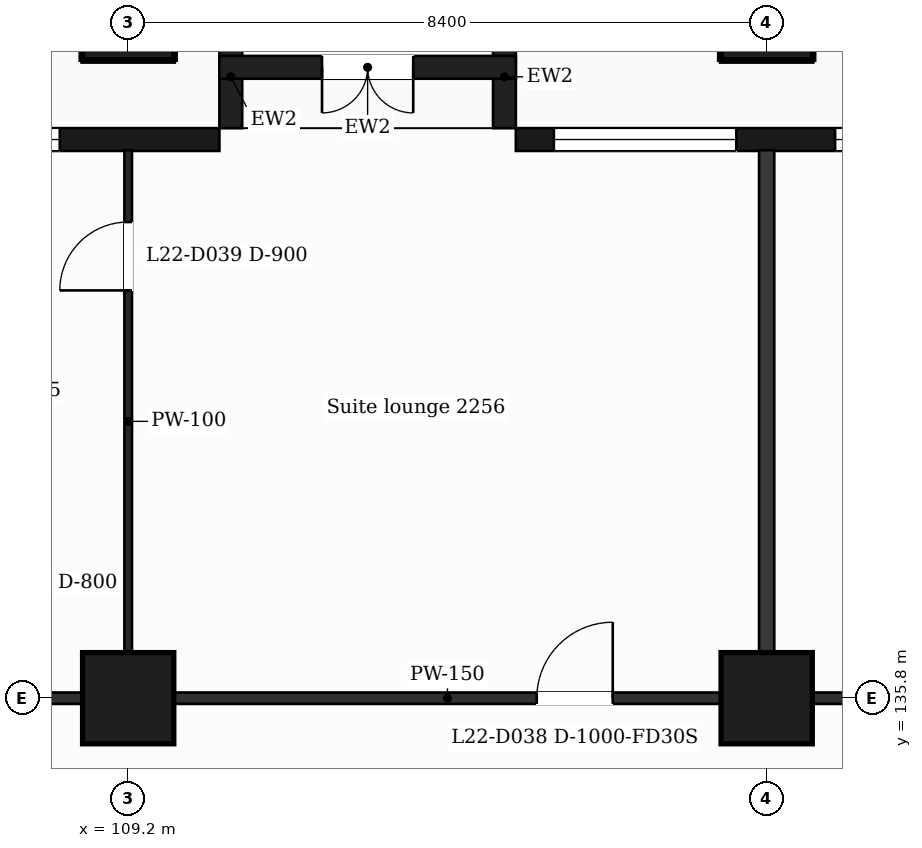
"""IFC4 building model, lengths in metres.
Left out: names, types, materials, properties, quantities, classifications, styles, units other than length and angle.
Written with IfcOpenShell. Run it as: python <this file> out.ifc"""

import sys

from ifc_helpers import new_model, si_unit, direction, frame, frame_2d, origin, origin_2d, place, context, subcontext, project, spatial, rectangle, extrude, element, fill, save


model = new_model("IFC4")
c1 = context("Model", 3, precision=1e-05, world=origin(), true_north=direction((0.0, 1.0)))
c2 = subcontext(c1, "Body", "Model", "MODEL_VIEW")
j1 = project(units=[si_unit("LENGTHUNIT", "METRE"), si_unit("PLANEANGLEUNIT", "RADIAN")], contexts=[c1])
p1 = place(None, origin())
s1 = spatial("IfcSite", under=j1, at=p1, CompositionType="ELEMENT")
p2 = place(p1, origin())
s2 = spatial("IfcBuilding", under=s1, at=p2, CompositionType="ELEMENT")
p3 = place(p2, frame((0.0, 0.0, 98.4)))
s3 = spatial("IfcBuildingStorey", under=s2, at=p3, CompositionType="ELEMENT", Elevation=98.4)
for number, where, z_axis, x_axis in (
    (1, (109.2, 135.8, 0.0), (0.0, 0.0, 1.0), (1.0, 0.0, 0.0)),
    (2, (117.6, 135.8, 0.0), (0.0, 0.0, 1.0), (1.0, 0.0, 0.0)),
    (3, (109.2, 144.8, 0.0), (0.0, 0.0, 1.0), (1.0, 0.0, 0.0)),
    (4, (117.6, 144.8, 0.0), (0.0, 0.0, 1.0), (1.0, 0.0, 0.0)),
):
    element("IfcColumn", number, at=place(p3, frame(where, z_axis=z_axis, x_axis=x_axis)), inside=s3, PredefinedType="COLUMN", context=c2, shape_type="SweptSolid", body=[
        extrude(rectangle(XDim=1.2, YDim=1.2, at=origin_2d()), origin(), (0.0, 0.0, 1.0), 3.7),
    ])
p4 = place(p3, frame((130.65, 143.15, 0.0), z_axis=(0.0, 0.0, 1.0), x_axis=(-1.0, 0.0, 0.0)))
e5 = element("IfcWall", 5, at=p4, inside=s3, PredefinedType="SOLIDWALL", context=c2, shape_type="SweptSolid", body=[
    extrude(rectangle(XDim=16.35, YDim=0.3, at=frame_2d((8.175, 0.0))), origin(), (0.0, 0.0, 1.0), 3.38),
])
p5 = place(p4, frame((1.95, 0.0, 0.9)))
e6 = element("IfcOpeningElement", 6, at=p5, cuts=e5, PredefinedType="OPENING", context=c2, shape_type="SweptSolid", body=[
    extrude(rectangle(XDim=1.2, YDim=2.1, at=frame_2d((0.6, 1.05))), frame((0.0, 0.16, 0.0), z_axis=(0.0, -1.0, 0.0), x_axis=(1.0, 0.0, 0.0)), (0.0, 0.0, 1.0), 0.32),
])
p6 = place(p4, frame((6.15, 0.0, 0.0)))
e7 = element("IfcOpeningElement", 7, at=p6, cuts=e5, PredefinedType="OPENING", context=c2, shape_type="SweptSolid", body=[
    extrude(rectangle(XDim=1.2, YDim=2.4, at=frame_2d((0.6, 1.2))), frame((0.0, 0.16, 0.0), z_axis=(0.0, -1.0, 0.0), x_axis=(1.0, 0.0, 0.0)), (0.0, 0.0, 1.0), 0.32),
])
p7 = place(p4, frame((9.75, 0.0, 0.9)))
e8 = element("IfcOpeningElement", 8, at=p7, cuts=e5, PredefinedType="OPENING", context=c2, shape_type="SweptSolid", body=[
    extrude(rectangle(XDim=2.4, YDim=2.1, at=frame_2d((1.2, 1.05))), frame((0.0, 0.16, 0.0), z_axis=(0.0, -1.0, 0.0), x_axis=(1.0, 0.0, 0.0)), (0.0, 0.0, 1.0), 0.32),
])
p8 = place(p4, frame((13.45, 0.0, 0.9)))
e9 = element("IfcOpeningElement", 9, at=p8, cuts=e5, PredefinedType="OPENING", context=c2, shape_type="SweptSolid", body=[
    extrude(rectangle(XDim=2.4, YDim=2.1, at=frame_2d((1.2, 1.05))), frame((0.0, 0.16, 0.0), z_axis=(0.0, -1.0, 0.0), x_axis=(1.0, 0.0, 0.0)), (0.0, 0.0, 1.0), 0.32),
])
p9 = place(p3, frame((110.4, 143.15, 0.0), z_axis=(0.0, 0.0, 1.0), x_axis=(-1.0, 0.0, 0.0)))
e10 = element("IfcWall", 10, at=p9, inside=s3, PredefinedType="SOLIDWALL", context=c2, shape_type="SweptSolid", body=[
    extrude(rectangle(XDim=14.4, YDim=0.3, at=frame_2d((7.2, 0.0))), origin(), (0.0, 0.0, 1.0), 3.38),
])
p10 = place(p9, frame((2.1, 0.0, 0.9)))
e11 = element("IfcOpeningElement", 11, at=p10, cuts=e10, PredefinedType="OPENING", context=c2, shape_type="SweptSolid", body=[
    extrude(rectangle(XDim=2.4, YDim=2.1, at=frame_2d((1.2, 1.05))), frame((0.0, 0.16, 0.0), z_axis=(0.0, -1.0, 0.0), x_axis=(1.0, 0.0, 0.0)), (0.0, 0.0, 1.0), 0.32),
])
p11 = place(p9, frame((6.9, 0.0, 0.0)))
e12 = element("IfcOpeningElement", 12, at=p11, cuts=e10, PredefinedType="OPENING", context=c2, shape_type="SweptSolid", body=[
    extrude(rectangle(XDim=1.2, YDim=2.4, at=frame_2d((0.6, 1.2))), frame((0.0, 0.16, 0.0), z_axis=(0.0, -1.0, 0.0), x_axis=(1.0, 0.0, 0.0)), (0.0, 0.0, 1.0), 0.32),
])
p12 = place(p9, frame((11.1, 0.0, 0.9)))
e13 = element("IfcOpeningElement", 13, at=p12, cuts=e10, PredefinedType="OPENING", context=c2, shape_type="SweptSolid", body=[
    extrude(rectangle(XDim=1.2, YDim=2.1, at=frame_2d((0.6, 1.05))), frame((0.0, 0.16, 0.0), z_axis=(0.0, -1.0, 0.0), x_axis=(1.0, 0.0, 0.0)), (0.0, 0.0, 1.0), 0.32),
])
for number, where, z_axis, x_axis in (
    (14, (114.15, 143.3, 0.0), (0.0, 0.0, 1.0), (0.0, 1.0, 0.0)),
    (15, (110.55, 143.3, 0.0), (0.0, 0.0, 1.0), (0.0, 1.0, 0.0)),
):
    element("IfcWall", number, at=place(p3, frame(where, z_axis=z_axis, x_axis=x_axis)), inside=s3, PredefinedType="SOLIDWALL", context=c2, shape_type="SweptSolid", body=[
        extrude(rectangle(XDim=1.35, YDim=0.3, at=frame_2d((0.675, 0.0))), origin(), (0.0, 0.0, 1.0), 3.38),
    ])
p13 = place(p3, frame((114.3, 144.1, 0.0), z_axis=(0.0, 0.0, 1.0), x_axis=(-1.0, 0.0, 0.0)))
e16 = element("IfcWall", 16, at=p13, inside=s3, PredefinedType="SOLIDWALL", context=c2, shape_type="SweptSolid", body=[
    extrude(rectangle(XDim=3.9, YDim=0.3, at=frame_2d((1.95, 0.0))), origin(), (0.0, 0.0, 1.0), 3.38),
])
p14 = place(p13, frame((1.35, 0.0, 0.0)))
e17 = element("IfcOpeningElement", 17, at=p14, cuts=e16, PredefinedType="OPENING", context=c2, shape_type="SweptSolid", body=[
    extrude(rectangle(XDim=1.2, YDim=2.4, at=frame_2d((0.6, 1.2))), frame((0.0, 0.16, 0.0), z_axis=(0.0, -1.0, 0.0), x_axis=(1.0, 0.0, 0.0)), (0.0, 0.0, 1.0), 0.32),
])
p15 = place(p3, frame((90.895, 135.8, 0.0), z_axis=(0.0, 0.0, 1.0), x_axis=(1.0, 0.0, 0.0)))
e18 = element("IfcWall", 18, at=p15, inside=s3, PredefinedType="PARTITIONING", context=c2, shape_type="SweptSolid", body=[
    extrude(rectangle(XDim=45.011, YDim=0.15, at=frame_2d((22.505, 0.0))), origin(), (0.0, 0.0, 1.0), 3.38),
])
p16 = place(p15, frame((7.455, 0.0, 0.0)))
e19 = element("IfcOpeningElement", 19, at=p16, cuts=e18, PredefinedType="OPENING", context=c2, shape_type="SweptSolid", body=[
    extrude(rectangle(XDim=1.0, YDim=2.1, at=frame_2d((0.5, 1.05))), frame((0.0, 0.085, 0.0), z_axis=(0.0, -1.0, 0.0), x_axis=(1.0, 0.0, 0.0)), (0.0, 0.0, 1.0), 0.17),
])
p17 = place(p15, frame((10.892, 0.0, 0.0)))
e20 = element("IfcOpeningElement", 20, at=p17, cuts=e18, PredefinedType="OPENING", context=c2, shape_type="SweptSolid", body=[
    extrude(rectangle(XDim=0.95, YDim=2.1, at=frame_2d((0.475, 1.05))), frame((0.0, 0.085, 0.0), z_axis=(0.0, -1.0, 0.0), x_axis=(1.0, 0.0, 0.0)), (0.0, 0.0, 1.0), 0.17),
])
p18 = place(p15, frame((23.68, 0.0, 0.0)))
e21 = element("IfcOpeningElement", 21, at=p18, cuts=e18, PredefinedType="OPENING", context=c2, shape_type="SweptSolid", body=[
    extrude(rectangle(XDim=1.0, YDim=2.1, at=frame_2d((0.5, 1.05))), frame((0.0, 0.085, 0.0), z_axis=(0.0, -1.0, 0.0), x_axis=(1.0, 0.0, 0.0)), (0.0, 0.0, 1.0), 0.17),
])
p19 = place(p15, frame((30.318, 0.0, 0.0)))
e22 = element("IfcOpeningElement", 22, at=p19, cuts=e18, PredefinedType="OPENING", context=c2, shape_type="SweptSolid", body=[
    extrude(rectangle(XDim=0.95, YDim=2.1, at=frame_2d((0.475, 1.05))), frame((0.0, 0.085, 0.0), z_axis=(0.0, -1.0, 0.0), x_axis=(1.0, 0.0, 0.0)), (0.0, 0.0, 1.0), 0.17),
])
p20 = place(p15, frame((36.355, 0.0, 0.0)))
e23 = element("IfcOpeningElement", 23, at=p20, cuts=e18, PredefinedType="OPENING", context=c2, shape_type="SweptSolid", body=[
    extrude(rectangle(XDim=1.0, YDim=2.1, at=frame_2d((0.5, 1.05))), frame((0.0, 0.085, 0.0), z_axis=(0.0, -1.0, 0.0), x_axis=(1.0, 0.0, 0.0)), (0.0, 0.0, 1.0), 0.17),
])
p21 = place(p3, frame((109.2, 135.875, 0.0), z_axis=(0.0, 0.0, 1.0), x_axis=(0.0, 1.0, 0.0)))
e24 = element("IfcWall", 24, at=p21, inside=s3, PredefinedType="PARTITIONING", context=c2, shape_type="SweptSolid", body=[
    extrude(rectangle(XDim=7.135, YDim=0.1, at=frame_2d((3.567, 0.0))), origin(), (0.0, 0.0, 1.0), 3.38),
])
p22 = place(p21, frame((5.29, 0.0, 0.0)))
e25 = element("IfcOpeningElement", 25, at=p22, cuts=e24, PredefinedType="OPENING", context=c2, shape_type="SweptSolid", body=[
    extrude(rectangle(XDim=0.9, YDim=2.1, at=frame_2d((0.45, 1.05))), frame((0.0, 0.06, 0.0), z_axis=(0.0, -1.0, 0.0), x_axis=(1.0, 0.0, 0.0)), (0.0, 0.0, 1.0), 0.12),
])
p23 = place(p3, frame((117.6, 135.875, 0.0), z_axis=(0.0, 0.0, 1.0), x_axis=(0.0, 1.0, 0.0)))
e26 = element("IfcWall", 26, at=p23, inside=s3, PredefinedType="PARTITIONING", context=c2, shape_type="SweptSolid", body=[
    extrude(rectangle(XDim=7.135, YDim=0.2, at=frame_2d((3.567, 0.0))), origin(), (0.0, 0.0, 1.0), 3.38),
])
p24 = place(p7, origin())
e27 = element("IfcWindow", 27, at=p24, inside=s3, PartitioningType="SINGLE_PANEL", PredefinedType="WINDOW", context=c2, shape_type="SweptSolid", body=[
    extrude(rectangle(XDim=2.4, YDim=2.1, at=frame_2d((1.2, 1.05))), frame((0.0, 0.03, 0.0), z_axis=(0.0, -1.0, 0.0), x_axis=(1.0, 0.0, 0.0)), (0.0, 0.0, 1.0), 0.06),
])
fill(e8, e27)
p25 = place(p8, origin())
e28 = element("IfcWindow", 28, at=p25, inside=s3, PartitioningType="SINGLE_PANEL", PredefinedType="WINDOW", context=c2, shape_type="SweptSolid", body=[
    extrude(rectangle(XDim=2.4, YDim=2.1, at=frame_2d((1.2, 1.05))), frame((0.0, 0.03, 0.0), z_axis=(0.0, -1.0, 0.0), x_axis=(1.0, 0.0, 0.0)), (0.0, 0.0, 1.0), 0.06),
])
fill(e9, e28)
p26 = place(p10, origin())
e29 = element("IfcWindow", 29, at=p26, inside=s3, PartitioningType="SINGLE_PANEL", PredefinedType="WINDOW", context=c2, shape_type="SweptSolid", body=[
    extrude(rectangle(XDim=2.4, YDim=2.1, at=frame_2d((1.2, 1.05))), frame((0.0, 0.03, 0.0), z_axis=(0.0, -1.0, 0.0), x_axis=(1.0, 0.0, 0.0)), (0.0, 0.0, 1.0), 0.06),
])
fill(e11, e29)
p27 = place(p14, origin())
e30 = element("IfcDoor", 30, at=p27, inside=s3, OperationType="DOUBLE_DOOR_SINGLE_SWING", PredefinedType="DOOR", context=c2, shape_type="SweptSolid", body=[
    extrude(rectangle(XDim=1.2, YDim=2.4, at=frame_2d((0.6, 1.2))), frame((0.0, 0.025, 0.0), z_axis=(0.0, -1.0, 0.0), x_axis=(1.0, 0.0, 0.0)), (0.0, 0.0, 1.0), 0.05),
])
fill(e17, e30)
p28 = place(p18, origin())
e31 = element("IfcDoor", 31, at=p28, inside=s3, OperationType="SINGLE_SWING_RIGHT", PredefinedType="DOOR", context=c2, shape_type="SweptSolid", body=[
    extrude(rectangle(XDim=1.0, YDim=2.1, at=frame_2d((0.5, 1.05))), frame((0.0, 0.025, 0.0), z_axis=(0.0, -1.0, 0.0), x_axis=(1.0, 0.0, 0.0)), (0.0, 0.0, 1.0), 0.05),
])
fill(e21, e31)
p29 = place(p22, origin())
e32 = element("IfcDoor", 32, at=p29, inside=s3, OperationType="SINGLE_SWING_LEFT", PredefinedType="DOOR", context=c2, shape_type="SweptSolid", body=[
    extrude(rectangle(XDim=0.9, YDim=2.1, at=frame_2d((0.45, 1.05))), frame((0.0, 0.025, 0.0), z_axis=(0.0, -1.0, 0.0), x_axis=(1.0, 0.0, 0.0)), (0.0, 0.0, 1.0), 0.05),
])
fill(e25, e32)
save(model, sys.argv[1])
